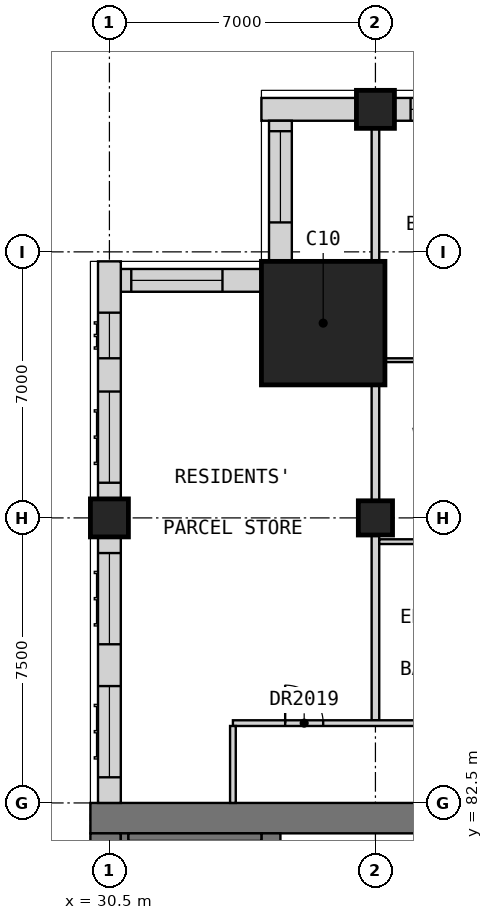
"""IFC4 building model, lengths in metres.
Left out: names, types, materials, properties, quantities, classifications, styles, units other than length and angle.
Written with IfcOpenShell. Run it as: python <this file> out.ifc"""

import sys

from ifc_helpers import new_model, si_unit, direction, frame, frame_2d, origin, origin_2d, place, context, subcontext, project, spatial, rectangle, extrude, element, fill, save


model = new_model("IFC4")
c1 = context("Model", 3, precision=1e-05, world=origin(), true_north=direction((0.0, 1.0)))
c2 = subcontext(c1, "Body", "Model", "MODEL_VIEW")
j1 = project(units=[si_unit("LENGTHUNIT", "METRE"), si_unit("PLANEANGLEUNIT", "RADIAN")], contexts=[c1])
p1 = place(None, origin())
s1 = spatial("IfcSite", under=j1, at=p1, CompositionType="ELEMENT")
p2 = place(p1, origin())
s2 = spatial("IfcBuilding", under=s1, at=p2, CompositionType="ELEMENT")
p3 = place(p2, frame((0.0, 0.0, 182.7)))
s3 = spatial("IfcBuildingStorey", under=s2, at=p3, CompositionType="ELEMENT", Elevation=182.7)
for number, where, z_axis, x_axis in (
    (1, (37.5, 100.75, 0.0), (0.0, 0.0, 1.0), (1.0, 0.0, 0.0)),
    (2, (30.5, 90.0, 0.0), (0.0, 0.0, 1.0), (1.0, 0.0, 0.0)),
):
    element("IfcColumn", number, at=place(p3, frame(where, z_axis=z_axis, x_axis=x_axis)), inside=s3, PredefinedType="COLUMN", context=c2, shape_type="SweptSolid", body=[
        extrude(rectangle(XDim=1.0, YDim=1.0, at=origin_2d()), origin(), (0.0, 0.0, 1.0), 3.5),
    ])
p4 = place(p3, frame((37.5, 90.0, 0.0), z_axis=(0.0, 0.0, 1.0), x_axis=(1.0, 0.0, 0.0)))
e3 = element("IfcColumn", 3, at=p4, inside=s3, PredefinedType="COLUMN", context=c2, shape_type="SweptSolid", body=[
    extrude(rectangle(XDim=0.9, YDim=0.9, at=origin_2d()), origin(), (0.0, 0.0, 1.0), 3.5),
])
p5 = place(p3, frame((36.125, 95.125, 0.0), z_axis=(0.0, 0.0, 1.0), x_axis=(1.0, 0.0, 0.0)))
e4 = element("IfcColumn", 4, at=p5, inside=s3, PredefinedType="COLUMN", context=c2, shape_type="SweptSolid", body=[
    extrude(rectangle(XDim=3.25, YDim=3.25, at=origin_2d()), origin(), (0.0, 0.0, 1.0), 3.5),
])
p6 = place(p3, frame((30.0, 82.1, 0.0), z_axis=(0.0, 0.0, 1.0), x_axis=(1.0, 0.0, 0.0)))
e5 = element("IfcWall", 5, at=p6, inside=s3, PredefinedType="SHEAR", context=c2, shape_type="SweptSolid", body=[
    extrude(rectangle(XDim=30.0, YDim=0.8, at=frame_2d((15.0, 0.0))), origin(), (0.0, 0.0, 1.0), 3.5),
])
p7 = place(p3, frame((30.4, 60.8, 0.0), z_axis=(0.0, 0.0, 1.0), x_axis=(0.0, 1.0, 0.0)))
e6 = element("IfcWall", 6, at=p7, inside=s3, PredefinedType="SHEAR", context=c2, shape_type="SweptSolid", body=[
    extrude(rectangle(XDim=20.9, YDim=0.8, at=frame_2d((10.45, 0.0))), origin(), (0.0, 0.0, 1.0), 3.5),
])
p8 = place(p3, frame((34.75, 78.3, 0.0), z_axis=(0.0, 0.0, 1.0), x_axis=(0.0, 1.0, 0.0)))
e7 = element("IfcWall", 7, at=p8, inside=s3, PredefinedType="SHEAR", context=c2, shape_type="SweptSolid", body=[
    extrude(rectangle(XDim=3.4, YDim=0.5, at=frame_2d((1.7, 0.0))), origin(), (0.0, 0.0, 1.0), 3.5),
])
p9 = place(p3, frame((44.5, 100.75, 0.0), z_axis=(0.0, 0.0, 1.0), x_axis=(-1.0, 0.0, 0.0)))
e8 = element("IfcWall", 8, at=p9, inside=s3, PredefinedType="SOLIDWALL", context=c2, shape_type="SweptSolid", body=[
    extrude(rectangle(XDim=6.5, YDim=0.6, at=frame_2d((3.25, 0.0))), origin(), (0.0, 0.0, 1.0), 2.75),
])
p10 = place(p9, frame((3.675, 0.0, 0.8)))
e9 = element("IfcOpeningElement", 9, at=p10, cuts=e8, PredefinedType="OPENING", context=c2, shape_type="SweptSolid", body=[
    extrude(rectangle(XDim=2.4, YDim=1.8, at=frame_2d((1.2, 0.9))), frame((0.0, 0.31, 0.0), z_axis=(0.0, -1.0, 0.0), x_axis=(1.0, 0.0, 0.0)), (0.0, 0.0, 1.0), 0.62),
])
p11 = place(p9, frame((0.425, 0.0, 0.8)))
e10 = element("IfcOpeningElement", 10, at=p11, cuts=e8, PredefinedType="OPENING", context=c2, shape_type="SweptSolid", body=[
    extrude(rectangle(XDim=2.4, YDim=1.8, at=frame_2d((1.2, 0.9))), frame((0.0, 0.31, 0.0), z_axis=(0.0, -1.0, 0.0), x_axis=(1.0, 0.0, 0.0)), (0.0, 0.0, 1.0), 0.62),
])
p12 = place(p3, frame((37.0, 100.75, 0.0), z_axis=(0.0, 0.0, 1.0), x_axis=(-1.0, 0.0, 0.0)))
e11 = element("IfcWall", 11, at=p12, inside=s3, PredefinedType="SOLIDWALL", context=c2, shape_type="SweptSolid", body=[
    extrude(rectangle(XDim=2.5, YDim=0.6, at=frame_2d((1.25, 0.0))), origin(), (0.0, 0.0, 1.0), 3.25),
])
p13 = place(p3, frame((35.0, 100.45, 0.0), z_axis=(0.0, 0.0, 1.0), x_axis=(0.0, -1.0, 0.0)))
e12 = element("IfcWall", 12, at=p13, inside=s3, PredefinedType="SOLIDWALL", context=c2, shape_type="SweptSolid", body=[
    extrude(rectangle(XDim=3.7, YDim=0.6, at=frame_2d((1.85, 0.0))), origin(), (0.0, 0.0, 1.0), 3.25),
])
p14 = place(p13, frame((0.275, 0.0, 0.8)))
e13 = element("IfcOpeningElement", 13, at=p14, cuts=e12, PredefinedType="OPENING", context=c2, shape_type="SweptSolid", body=[
    extrude(rectangle(XDim=2.4, YDim=1.8, at=frame_2d((1.2, 0.9))), frame((0.0, 0.31, 0.0), z_axis=(0.0, -1.0, 0.0), x_axis=(1.0, 0.0, 0.0)), (0.0, 0.0, 1.0), 0.62),
])
p15 = place(p3, frame((34.5, 96.25, 0.0), z_axis=(0.0, 0.0, 1.0), x_axis=(-1.0, 0.0, 0.0)))
e14 = element("IfcWall", 14, at=p15, inside=s3, PredefinedType="SOLIDWALL", context=c2, shape_type="SweptSolid", body=[
    extrude(rectangle(XDim=3.7, YDim=0.6, at=frame_2d((1.85, 0.0))), origin(), (0.0, 0.0, 1.0), 3.25),
])
p16 = place(p15, frame((1.025, 0.0, 0.8)))
e15 = element("IfcOpeningElement", 15, at=p16, cuts=e14, PredefinedType="OPENING", context=c2, shape_type="SweptSolid", body=[
    extrude(rectangle(XDim=2.4, YDim=1.8, at=frame_2d((1.2, 0.9))), frame((0.0, 0.31, 0.0), z_axis=(0.0, -1.0, 0.0), x_axis=(1.0, 0.0, 0.0)), (0.0, 0.0, 1.0), 0.62),
])
p17 = place(p3, frame((30.5, 96.75, 0.0), z_axis=(0.0, 0.0, 1.0), x_axis=(0.0, -1.0, 0.0)))
e16 = element("IfcWall", 16, at=p17, inside=s3, PredefinedType="SOLIDWALL", context=c2, shape_type="SweptSolid", body=[
    extrude(rectangle(XDim=6.25, YDim=0.6, at=frame_2d((3.125, 0.0))), origin(), (0.0, 0.0, 1.0), 2.75),
])
p18 = place(p17, frame((3.425, 0.0, 0.8)))
e17 = element("IfcOpeningElement", 17, at=p18, cuts=e16, PredefinedType="OPENING", context=c2, shape_type="SweptSolid", body=[
    extrude(rectangle(XDim=2.4, YDim=1.8, at=frame_2d((1.2, 0.9))), frame((0.0, 0.31, 0.0), z_axis=(0.0, -1.0, 0.0), x_axis=(1.0, 0.0, 0.0)), (0.0, 0.0, 1.0), 0.62),
])
p19 = place(p17, frame((1.35, 0.0, 0.8)))
e18 = element("IfcOpeningElement", 18, at=p19, cuts=e16, PredefinedType="OPENING", context=c2, shape_type="SweptSolid", body=[
    extrude(rectangle(XDim=1.2, YDim=1.8, at=frame_2d((0.6, 0.9))), frame((0.0, 0.31, 0.0), z_axis=(0.0, -1.0, 0.0), x_axis=(1.0, 0.0, 0.0)), (0.0, 0.0, 1.0), 0.62),
])
p20 = place(p3, frame((30.5, 89.5, 0.0), z_axis=(0.0, 0.0, 1.0), x_axis=(0.0, -1.0, 0.0)))
e19 = element("IfcWall", 19, at=p20, inside=s3, PredefinedType="SOLIDWALL", context=c2, shape_type="SweptSolid", body=[
    extrude(rectangle(XDim=7.0, YDim=0.6, at=frame_2d((3.5, 0.0))), origin(), (0.0, 0.0, 1.0), 3.25),
])
p21 = place(p20, frame((3.925, 0.0, 0.8)))
e20 = element("IfcOpeningElement", 20, at=p21, cuts=e19, PredefinedType="OPENING", context=c2, shape_type="SweptSolid", body=[
    extrude(rectangle(XDim=2.4, YDim=1.8, at=frame_2d((1.2, 0.9))), frame((0.0, 0.31, 0.0), z_axis=(0.0, -1.0, 0.0), x_axis=(1.0, 0.0, 0.0)), (0.0, 0.0, 1.0), 0.62),
])
p22 = place(p20, frame((0.425, 0.0, 0.8)))
e21 = element("IfcOpeningElement", 21, at=p22, cuts=e19, PredefinedType="OPENING", context=c2, shape_type="SweptSolid", body=[
    extrude(rectangle(XDim=2.4, YDim=1.8, at=frame_2d((1.2, 0.9))), frame((0.0, 0.31, 0.0), z_axis=(0.0, -1.0, 0.0), x_axis=(1.0, 0.0, 0.0)), (0.0, 0.0, 1.0), 0.62),
])
p23 = place(p3, frame((30.9, 60.8, 0.0), z_axis=(0.0, 0.0, 1.0), x_axis=(0.0, 1.0, 0.0)))
e22 = element("IfcWall", 22, at=p23, inside=s3, PredefinedType="SOLIDWALL", context=c2, shape_type="SweptSolid", body=[
    extrude(rectangle(XDim=20.9, YDim=0.2, at=frame_2d((10.45, 0.0))), origin(), (0.0, 0.0, 1.0), 3.25),
])
p24 = place(p3, frame((31.0, 81.6, 0.0), z_axis=(0.0, 0.0, 1.0), x_axis=(1.0, 0.0, 0.0)))
e23 = element("IfcWall", 23, at=p24, inside=s3, PredefinedType="SOLIDWALL", context=c2, shape_type="SweptSolid", body=[
    extrude(rectangle(XDim=3.5, YDim=0.2, at=frame_2d((1.75, 0.0))), origin(), (0.0, 0.0, 1.0), 3.25),
])
p25 = place(p3, frame((37.5, 84.675, 0.0), z_axis=(0.0, 0.0, 1.0), x_axis=(0.0, 1.0, 0.0)))
e24 = element("IfcWall", 24, at=p25, inside=s3, PredefinedType="PARTITIONING", context=c2, shape_type="SweptSolid", body=[
    extrude(rectangle(XDim=16.575, YDim=0.2, at=frame_2d((8.288, 0.0))), origin(), (0.0, 0.0, 1.0), 2.75),
])
p26 = place(p3, frame((33.75, 84.6, 0.0), z_axis=(0.0, 0.0, 1.0), x_axis=(1.0, 0.0, 0.0)))
e25 = element("IfcWall", 25, at=p26, inside=s3, PredefinedType="PARTITIONING", context=c2, shape_type="SweptSolid", body=[
    extrude(rectangle(XDim=28.35, YDim=0.15, at=frame_2d((14.175, 0.0))), origin(), (0.0, 0.0, 1.0), 3.25),
])
p27 = place(p26, frame((1.375, 0.0, 0.0)))
e26 = element("IfcOpeningElement", 26, at=p27, cuts=e25, PredefinedType="OPENING", context=c2, shape_type="SweptSolid", body=[
    extrude(rectangle(XDim=1.0, YDim=2.1, at=frame_2d((0.5, 1.05))), frame((0.0, 0.085, 0.0), z_axis=(0.0, -1.0, 0.0), x_axis=(1.0, 0.0, 0.0)), (0.0, 0.0, 1.0), 0.17),
])
p28 = place(p26, frame((8.925, 0.0, 0.0)))
e27 = element("IfcOpeningElement", 27, at=p28, cuts=e25, PredefinedType="OPENING", context=c2, shape_type="SweptSolid", body=[
    extrude(rectangle(XDim=0.9, YDim=2.1, at=frame_2d((0.45, 1.05))), frame((0.0, 0.085, 0.0), z_axis=(0.0, -1.0, 0.0), x_axis=(1.0, 0.0, 0.0)), (0.0, 0.0, 1.0), 0.17),
])
p29 = place(p26, frame((16.425, 0.0, 0.0)))
e28 = element("IfcOpeningElement", 28, at=p29, cuts=e25, PredefinedType="OPENING", context=c2, shape_type="SweptSolid", body=[
    extrude(rectangle(XDim=0.9, YDim=2.1, at=frame_2d((0.45, 1.05))), frame((0.0, 0.085, 0.0), z_axis=(0.0, -1.0, 0.0), x_axis=(1.0, 0.0, 0.0)), (0.0, 0.0, 1.0), 0.17),
])
p30 = place(p3, frame((33.75, 82.5, 0.0), z_axis=(0.0, 0.0, 1.0), x_axis=(0.0, 1.0, 0.0)))
e29 = element("IfcWall", 29, at=p30, inside=s3, PredefinedType="PARTITIONING", context=c2, shape_type="SweptSolid", body=[
    extrude(rectangle(XDim=2.025, YDim=0.15, at=frame_2d((1.012, 0.0))), origin(), (0.0, 0.0, 1.0), 3.25),
])
p31 = place(p3, frame((37.6, 94.15, 0.0), z_axis=(0.0, 0.0, 1.0), x_axis=(1.0, 0.0, 0.0)))
e30 = element("IfcWall", 30, at=p31, inside=s3, PredefinedType="PARTITIONING", context=c2, shape_type="SweptSolid", body=[
    extrude(rectangle(XDim=22.3, YDim=0.1, at=frame_2d((11.15, 0.0))), origin(), (0.0, 0.0, 1.0), 3.25),
])
p32 = place(p31, frame((1.325, 0.0, 0.0)))
e31 = element("IfcOpeningElement", 31, at=p32, cuts=e30, PredefinedType="OPENING", context=c2, shape_type="SweptSolid", body=[
    extrude(rectangle(XDim=0.9, YDim=2.1, at=frame_2d((0.45, 1.05))), frame((0.0, 0.06, 0.0), z_axis=(0.0, -1.0, 0.0), x_axis=(1.0, 0.0, 0.0)), (0.0, 0.0, 1.0), 0.12),
])
p33 = place(p31, frame((5.075, 0.0, 0.0)))
e32 = element("IfcOpeningElement", 32, at=p33, cuts=e30, PredefinedType="OPENING", context=c2, shape_type="SweptSolid", body=[
    extrude(rectangle(XDim=0.9, YDim=2.1, at=frame_2d((0.45, 1.05))), frame((0.0, 0.06, 0.0), z_axis=(0.0, -1.0, 0.0), x_axis=(1.0, 0.0, 0.0)), (0.0, 0.0, 1.0), 0.12),
])
p34 = place(p31, frame((12.575, 0.0, 0.0)))
e33 = element("IfcOpeningElement", 33, at=p34, cuts=e30, PredefinedType="OPENING", context=c2, shape_type="SweptSolid", body=[
    extrude(rectangle(XDim=0.9, YDim=2.1, at=frame_2d((0.45, 1.05))), frame((0.0, 0.06, 0.0), z_axis=(0.0, -1.0, 0.0), x_axis=(1.0, 0.0, 0.0)), (0.0, 0.0, 1.0), 0.12),
])
p35 = place(p31, frame((20.075, 0.0, 0.0)))
e34 = element("IfcOpeningElement", 34, at=p35, cuts=e30, PredefinedType="OPENING", context=c2, shape_type="SweptSolid", body=[
    extrude(rectangle(XDim=0.9, YDim=2.1, at=frame_2d((0.45, 1.05))), frame((0.0, 0.06, 0.0), z_axis=(0.0, -1.0, 0.0), x_axis=(1.0, 0.0, 0.0)), (0.0, 0.0, 1.0), 0.12),
])
p36 = place(p3, frame((37.6, 89.375, 0.0), z_axis=(0.0, 0.0, 1.0), x_axis=(1.0, 0.0, 0.0)))
e35 = element("IfcWall", 35, at=p36, inside=s3, PredefinedType="PARTITIONING", context=c2, shape_type="SweptSolid", body=[
    extrude(rectangle(XDim=3.65, YDim=0.125, at=frame_2d((1.825, 0.0))), origin(), (0.0, 0.0, 1.0), 3.25),
])
p37 = place(p36, frame((1.325, 0.0, 0.0)))
e36 = element("IfcOpeningElement", 36, at=p37, cuts=e35, PredefinedType="OPENING", context=c2, shape_type="SweptSolid", body=[
    extrude(rectangle(XDim=0.9, YDim=2.1, at=frame_2d((0.45, 1.05))), frame((0.0, 0.073, 0.0), z_axis=(0.0, -1.0, 0.0), x_axis=(1.0, 0.0, 0.0)), (0.0, 0.0, 1.0), 0.145),
])
p38 = place(p10, origin())
e37 = element("IfcWindow", 37, at=p38, inside=s3, PartitioningType="SINGLE_PANEL", PredefinedType="WINDOW", context=c2, shape_type="SweptSolid", body=[
    extrude(rectangle(XDim=2.4, YDim=1.8, at=frame_2d((1.2, 0.9))), frame((0.0, -0.07, 0.0), z_axis=(0.0, -1.0, 0.0), x_axis=(1.0, 0.0, 0.0)), (0.0, 0.0, 1.0), 0.06),
])
fill(e9, e37)
p39 = place(p14, origin())
e38 = element("IfcWindow", 38, at=p39, inside=s3, PartitioningType="SINGLE_PANEL", PredefinedType="WINDOW", context=c2, shape_type="SweptSolid", body=[
    extrude(rectangle(XDim=2.4, YDim=1.8, at=frame_2d((1.2, 0.9))), frame((0.0, -0.07, 0.0), z_axis=(0.0, -1.0, 0.0), x_axis=(1.0, 0.0, 0.0)), (0.0, 0.0, 1.0), 0.06),
])
fill(e13, e38)
p40 = place(p16, origin())
e39 = element("IfcWindow", 39, at=p40, inside=s3, PartitioningType="SINGLE_PANEL", PredefinedType="WINDOW", context=c2, shape_type="SweptSolid", body=[
    extrude(rectangle(XDim=2.4, YDim=1.8, at=frame_2d((1.2, 0.9))), frame((0.0, -0.07, 0.0), z_axis=(0.0, -1.0, 0.0), x_axis=(1.0, 0.0, 0.0)), (0.0, 0.0, 1.0), 0.06),
])
fill(e15, e39)
p41 = place(p18, origin())
e40 = element("IfcWindow", 40, at=p41, inside=s3, PartitioningType="SINGLE_PANEL", PredefinedType="WINDOW", context=c2, shape_type="SweptSolid", body=[
    extrude(rectangle(XDim=2.4, YDim=1.8, at=frame_2d((1.2, 0.9))), frame((0.0, -0.07, 0.0), z_axis=(0.0, -1.0, 0.0), x_axis=(1.0, 0.0, 0.0)), (0.0, 0.0, 1.0), 0.06),
])
fill(e17, e40)
p42 = place(p19, origin())
e41 = element("IfcWindow", 41, at=p42, inside=s3, PartitioningType="SINGLE_PANEL", PredefinedType="WINDOW", context=c2, shape_type="SweptSolid", body=[
    extrude(rectangle(XDim=1.2, YDim=1.8, at=frame_2d((0.6, 0.9))), frame((0.0, -0.07, 0.0), z_axis=(0.0, -1.0, 0.0), x_axis=(1.0, 0.0, 0.0)), (0.0, 0.0, 1.0), 0.06),
])
fill(e18, e41)
p43 = place(p21, origin())
e42 = element("IfcWindow", 42, at=p43, inside=s3, PartitioningType="SINGLE_PANEL", PredefinedType="WINDOW", context=c2, shape_type="SweptSolid", body=[
    extrude(rectangle(XDim=2.4, YDim=1.8, at=frame_2d((1.2, 0.9))), frame((0.0, -0.07, 0.0), z_axis=(0.0, -1.0, 0.0), x_axis=(1.0, 0.0, 0.0)), (0.0, 0.0, 1.0), 0.06),
])
fill(e20, e42)
p44 = place(p22, origin())
e43 = element("IfcWindow", 43, at=p44, inside=s3, PartitioningType="SINGLE_PANEL", PredefinedType="WINDOW", context=c2, shape_type="SweptSolid", body=[
    extrude(rectangle(XDim=2.4, YDim=1.8, at=frame_2d((1.2, 0.9))), frame((0.0, -0.07, 0.0), z_axis=(0.0, -1.0, 0.0), x_axis=(1.0, 0.0, 0.0)), (0.0, 0.0, 1.0), 0.06),
])
fill(e21, e43)
p45 = place(p27, origin())
e44 = element("IfcDoor", 44, at=p45, inside=s3, OperationType="SINGLE_SWING_LEFT", PredefinedType="DOOR", context=c2, shape_type="SweptSolid", body=[
    extrude(rectangle(XDim=1.0, YDim=2.1, at=frame_2d((0.5, 1.05))), frame((0.0, 0.025, 0.0), z_axis=(0.0, -1.0, 0.0), x_axis=(1.0, 0.0, 0.0)), (0.0, 0.0, 1.0), 0.05),
])
fill(e26, e44)
save(model, sys.argv[1])
